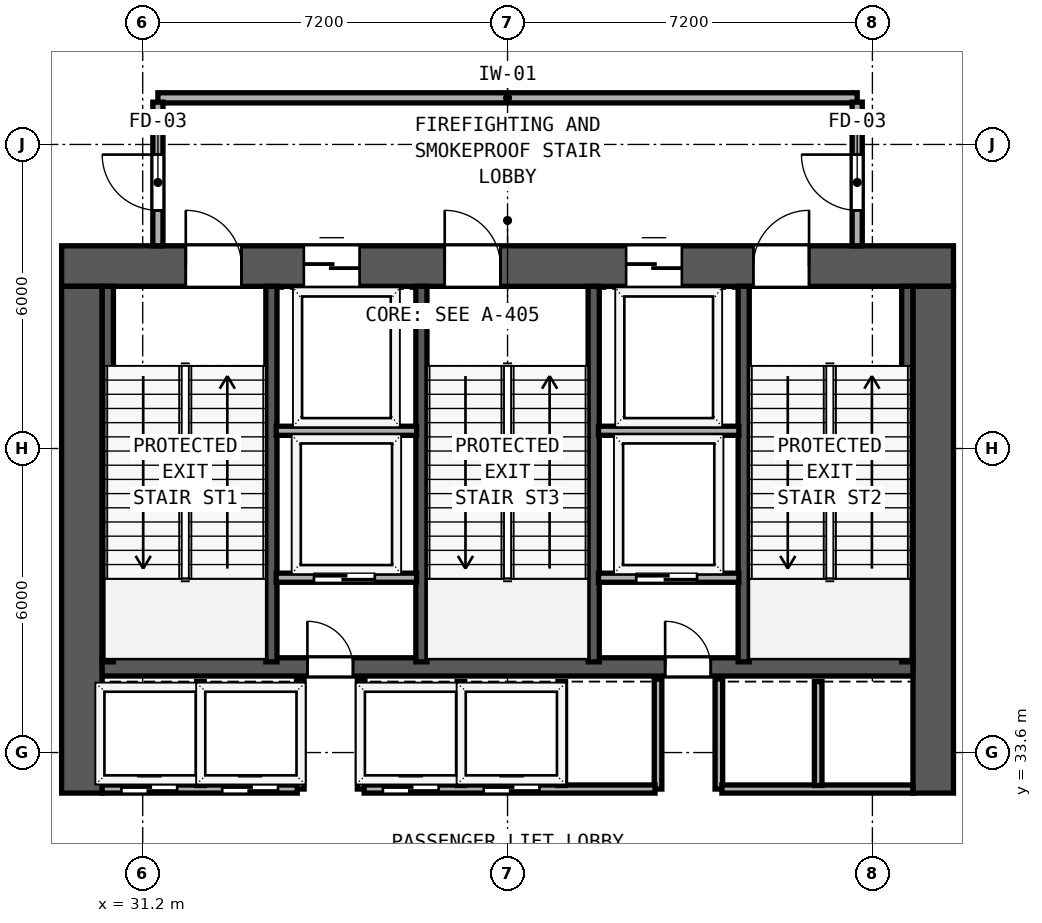
"""IFC4 building model, lengths in metres.
Left out: names, types, materials, properties, quantities, classifications, styles, units other than length and angle.
Written with IfcOpenShell. Run it as: python <this file> out.ifc"""

import sys

from ifc_helpers import new_model, si_unit, direction, frame, frame_2d, origin, place, context, subcontext, project, spatial, rectangle, extrude, element, fill, save


model = new_model("IFC4")
c1 = context("Model", 3, precision=1e-05, world=origin(), true_north=direction((0.0, 1.0)))
c2 = subcontext(c1, "Body", "Model", "MODEL_VIEW")
j1 = project(units=[si_unit("LENGTHUNIT", "METRE"), si_unit("PLANEANGLEUNIT", "RADIAN")], contexts=[c1])
p1 = place(None, origin())
s1 = spatial("IfcSite", under=j1, at=p1, CompositionType="ELEMENT")
p2 = place(p1, origin())
s2 = spatial("IfcBuilding", under=s1, at=p2, CompositionType="ELEMENT")
p3 = place(p2, frame((0.0, 0.0, 10.2)))
s3 = spatial("IfcBuildingStorey", under=s2, at=p3, CompositionType="ELEMENT", Elevation=10.2)
p4 = place(p3, frame((29.6, 43.2, 0.0), z_axis=(0.0, 0.0, 1.0), x_axis=(1.0, 0.0, 0.0)))
e1 = element("IfcWall", 1, at=p4, inside=s3, PredefinedType="SHEAR", context=c2, shape_type="SweptSolid", body=[
    extrude(rectangle(XDim=17.6, YDim=0.8, at=frame_2d((8.8, 0.0))), origin(), (0.0, 0.0, 1.0), 5.16),
])
p5 = place(p4, frame((2.45, 0.0, 0.0)))
e2 = element("IfcOpeningElement", 2, at=p5, cuts=e1, PredefinedType="OPENING", context=c2, shape_type="SweptSolid", body=[
    extrude(rectangle(XDim=1.1, YDim=2.15, at=frame_2d((0.55, 1.075))), frame((0.0, 0.41, 0.0), z_axis=(0.0, -1.0, 0.0), x_axis=(1.0, 0.0, 0.0)), (0.0, 0.0, 1.0), 0.82),
])
p6 = place(p4, frame((7.56, 0.0, 0.0)))
e3 = element("IfcOpeningElement", 3, at=p6, cuts=e1, PredefinedType="OPENING", context=c2, shape_type="SweptSolid", body=[
    extrude(rectangle(XDim=1.1, YDim=2.15, at=frame_2d((0.55, 1.075))), frame((0.0, 0.41, 0.0), z_axis=(0.0, -1.0, 0.0), x_axis=(1.0, 0.0, 0.0)), (0.0, 0.0, 1.0), 0.82),
])
p7 = place(p4, frame((13.65, 0.0, 0.0)))
e4 = element("IfcOpeningElement", 4, at=p7, cuts=e1, PredefinedType="OPENING", context=c2, shape_type="SweptSolid", body=[
    extrude(rectangle(XDim=1.1, YDim=2.15, at=frame_2d((0.55, 1.075))), frame((0.0, 0.41, 0.0), z_axis=(0.0, -1.0, 0.0), x_axis=(1.0, 0.0, 0.0)), (0.0, 0.0, 1.0), 0.82),
])
p8 = place(p4, frame((4.78, 0.0, 0.0)))
e5 = element("IfcOpeningElement", 5, at=p8, cuts=e1, PredefinedType="OPENING", context=c2, shape_type="SweptSolid", body=[
    extrude(rectangle(XDim=1.1, YDim=2.2, at=frame_2d((0.55, 1.1))), frame((0.0, 0.41, 0.0), z_axis=(0.0, -1.0, 0.0), x_axis=(1.0, 0.0, 0.0)), (0.0, 0.0, 1.0), 0.82),
])
p9 = place(p4, frame((11.14, 0.0, 0.0)))
e6 = element("IfcOpeningElement", 6, at=p9, cuts=e1, PredefinedType="OPENING", context=c2, shape_type="SweptSolid", body=[
    extrude(rectangle(XDim=1.1, YDim=2.2, at=frame_2d((0.55, 1.1))), frame((0.0, 0.41, 0.0), z_axis=(0.0, -1.0, 0.0), x_axis=(1.0, 0.0, 0.0)), (0.0, 0.0, 1.0), 0.82),
])
for number, where, z_axis, x_axis in (
    (7, (30.0, 32.8, 0.0), (0.0, 0.0, 1.0), (0.0, 1.0, 0.0)),
    (8, (46.8, 32.8, 0.0), (0.0, 0.0, 1.0), (0.0, 1.0, 0.0)),
):
    element("IfcWall", number, at=place(p3, frame(where, z_axis=z_axis, x_axis=x_axis)), inside=s3, PredefinedType="SHEAR", context=c2, shape_type="SweptSolid", body=[
        extrude(rectangle(XDim=10.0, YDim=0.8, at=frame_2d((5.0, 0.0))), origin(), (0.0, 0.0, 1.0), 5.16),
    ])
p10 = place(p3, frame((30.4, 35.29, 0.0), z_axis=(0.0, 0.0, 1.0), x_axis=(1.0, 0.0, 0.0)))
e9 = element("IfcWall", 9, at=p10, inside=s3, PredefinedType="SHEAR", context=c2, shape_type="SweptSolid", body=[
    extrude(rectangle(XDim=16.0, YDim=0.36, at=frame_2d((8.0, 0.0))), origin(), (0.0, 0.0, 1.0), 5.16),
])
p11 = place(p10, frame((4.95, 0.0, 0.0), z_axis=(0.0, 0.0, 1.0), x_axis=(-1.0, 0.0, 0.0)))
e10 = element("IfcOpeningElement", 10, at=p11, cuts=e9, PredefinedType="OPENING", context=c2, shape_type="SweptSolid", body=[
    extrude(rectangle(XDim=0.9, YDim=2.1, at=frame_2d((0.45, 1.05))), frame((0.0, 0.19, 0.0), z_axis=(0.0, -1.0, 0.0), x_axis=(1.0, 0.0, 0.0)), (0.0, 0.0, 1.0), 0.38),
])
p12 = place(p10, frame((12.01, 0.0, 0.0), z_axis=(0.0, 0.0, 1.0), x_axis=(-1.0, 0.0, 0.0)))
e11 = element("IfcOpeningElement", 11, at=p12, cuts=e9, PredefinedType="OPENING", context=c2, shape_type="SweptSolid", body=[
    extrude(rectangle(XDim=0.9, YDim=2.1, at=frame_2d((0.45, 1.05))), frame((0.0, 0.19, 0.0), z_axis=(0.0, -1.0, 0.0), x_axis=(1.0, 0.0, 0.0)), (0.0, 0.0, 1.0), 0.38),
])
for number, where, z_axis, x_axis in (
    (12, (30.512, 35.39, 0.0), (0.0, 0.0, 1.0), (0.0, 1.0, 0.0)),
    (13, (33.74, 35.39, 0.0), (0.0, 0.0, 1.0), (0.0, 1.0, 0.0)),
    (14, (36.7, 35.39, 0.0), (0.0, 0.0, 1.0), (0.0, 1.0, 0.0)),
    (15, (40.1, 35.39, 0.0), (0.0, 0.0, 1.0), (0.0, 1.0, 0.0)),
    (16, (43.06, 35.39, 0.0), (0.0, 0.0, 1.0), (0.0, 1.0, 0.0)),
    (17, (46.288, 35.39, 0.0), (0.0, 0.0, 1.0), (0.0, 1.0, 0.0)),
):
    element("IfcWall", number, at=place(p3, frame(where, z_axis=z_axis, x_axis=x_axis)), inside=s3, PredefinedType="SHEAR", context=c2, shape_type="SweptSolid", body=[
        extrude(rectangle(XDim=7.41, YDim=0.22, at=frame_2d((3.705, 0.0))), origin(), (0.0, 0.0, 1.0), 5.16),
    ])
p13 = place(p3, frame((31.5, 46.52, 0.0), z_axis=(0.0, 0.0, 1.0), x_axis=(1.0, 0.0, 0.0)))
e18 = element("IfcWall", 18, at=p13, inside=s3, PredefinedType="SOLIDWALL", context=c2, shape_type="SweptSolid", body=[
    extrude(rectangle(XDim=13.8, YDim=0.2, at=frame_2d((6.9, 0.0))), origin(), (0.0, 0.0, 1.0), 5.16),
])
p14 = place(p3, frame((31.5, 43.6, 0.0), z_axis=(0.0, 0.0, 1.0), x_axis=(0.0, 1.0, 0.0)))
e19 = element("IfcWall", 19, at=p14, inside=s3, PredefinedType="SOLIDWALL", context=c2, shape_type="SweptSolid", body=[
    extrude(rectangle(XDim=2.835, YDim=0.2, at=frame_2d((1.417, 0.0))), origin(), (0.0, 0.0, 1.0), 5.16),
])
p15 = place(p14, frame((1.8, 0.0, 0.0), z_axis=(0.0, 0.0, 1.0), x_axis=(-1.0, 0.0, 0.0)))
e20 = element("IfcOpeningElement", 20, at=p15, cuts=e19, PredefinedType="OPENING", context=c2, shape_type="SweptSolid", body=[
    extrude(rectangle(XDim=1.1, YDim=2.15, at=frame_2d((0.55, 1.075))), frame((0.0, 0.11, 0.0), z_axis=(0.0, -1.0, 0.0), x_axis=(1.0, 0.0, 0.0)), (0.0, 0.0, 1.0), 0.22),
])
p16 = place(p3, frame((45.3, 43.6, 0.0), z_axis=(0.0, 0.0, 1.0), x_axis=(0.0, 1.0, 0.0)))
e21 = element("IfcWall", 21, at=p16, inside=s3, PredefinedType="SOLIDWALL", context=c2, shape_type="SweptSolid", body=[
    extrude(rectangle(XDim=2.835, YDim=0.2, at=frame_2d((1.417, 0.0))), origin(), (0.0, 0.0, 1.0), 5.16),
])
p17 = place(p16, frame((0.7, 0.0, 0.0)))
e22 = element("IfcOpeningElement", 22, at=p17, cuts=e21, PredefinedType="OPENING", context=c2, shape_type="SweptSolid", body=[
    extrude(rectangle(XDim=1.1, YDim=2.15, at=frame_2d((0.55, 1.075))), frame((0.0, 0.11, 0.0), z_axis=(0.0, -1.0, 0.0), x_axis=(1.0, 0.0, 0.0)), (0.0, 0.0, 1.0), 0.22),
])
for number, where, z_axis, x_axis in (
    (23, (33.835, 39.95, 0.0), (0.0, 0.0, 1.0), (1.0, 0.0, 0.0)),
    (24, (40.195, 39.95, 0.0), (0.0, 0.0, 1.0), (1.0, 0.0, 0.0)),
):
    element("IfcWall", number, at=place(p3, frame(where, z_axis=z_axis, x_axis=x_axis)), inside=s3, PredefinedType="SOLIDWALL", context=c2, shape_type="SweptSolid", body=[
        extrude(rectangle(XDim=2.77, YDim=0.18, at=frame_2d((1.385, 0.0))), origin(), (0.0, 0.0, 1.0), 5.16),
    ])
p18 = place(p3, frame((33.835, 37.05, 0.0), z_axis=(0.0, 0.0, 1.0), x_axis=(1.0, 0.0, 0.0)))
e25 = element("IfcWall", 25, at=p18, inside=s3, PredefinedType="SOLIDWALL", context=c2, shape_type="SweptSolid", body=[
    extrude(rectangle(XDim=2.77, YDim=0.18, at=frame_2d((1.385, 0.0))), origin(), (0.0, 0.0, 1.0), 5.16),
])
p19 = place(p18, frame((1.945, 0.0, 0.0), z_axis=(0.0, 0.0, 1.0), x_axis=(-1.0, 0.0, 0.0)))
e26 = element("IfcOpeningElement", 26, at=p19, cuts=e25, PredefinedType="OPENING", context=c2, shape_type="SweptSolid", body=[
    extrude(rectangle(XDim=1.2, YDim=2.2, at=frame_2d((0.6, 1.1))), frame((0.0, 0.1, 0.0), z_axis=(0.0, -1.0, 0.0), x_axis=(1.0, 0.0, 0.0)), (0.0, 0.0, 1.0), 0.2),
])
for number, where, z_axis, x_axis in (
    (27, (34.31, 32.88, 0.0), (0.0, 0.0, 1.0), (0.0, 1.0, 0.0)),
    (28, (35.51, 32.88, 0.0), (0.0, 0.0, 1.0), (0.0, 1.0, 0.0)),
):
    element("IfcWall", number, at=place(p3, frame(where, z_axis=z_axis, x_axis=x_axis)), inside=s3, PredefinedType="SOLIDWALL", context=c2, shape_type="SweptSolid", body=[
        extrude(rectangle(XDim=2.17, YDim=0.15, at=frame_2d((1.085, 0.0))), origin(), (0.0, 0.0, 1.0), 5.16),
    ])
p20 = place(p3, frame((40.195, 37.05, 0.0), z_axis=(0.0, 0.0, 1.0), x_axis=(1.0, 0.0, 0.0)))
e29 = element("IfcWall", 29, at=p20, inside=s3, PredefinedType="SOLIDWALL", context=c2, shape_type="SweptSolid", body=[
    extrude(rectangle(XDim=2.77, YDim=0.18, at=frame_2d((1.385, 0.0))), origin(), (0.0, 0.0, 1.0), 5.16),
])
p21 = place(p20, frame((1.945, 0.0, 0.0), z_axis=(0.0, 0.0, 1.0), x_axis=(-1.0, 0.0, 0.0)))
e30 = element("IfcOpeningElement", 30, at=p21, cuts=e29, PredefinedType="OPENING", context=c2, shape_type="SweptSolid", body=[
    extrude(rectangle(XDim=1.2, YDim=2.2, at=frame_2d((0.6, 1.1))), frame((0.0, 0.1, 0.0), z_axis=(0.0, -1.0, 0.0), x_axis=(1.0, 0.0, 0.0)), (0.0, 0.0, 1.0), 0.2),
])
for number, where, z_axis, x_axis in (
    (31, (41.37, 32.88, 0.0), (0.0, 0.0, 1.0), (0.0, 1.0, 0.0)),
    (32, (42.57, 32.88, 0.0), (0.0, 0.0, 1.0), (0.0, 1.0, 0.0)),
):
    element("IfcWall", number, at=place(p3, frame(where, z_axis=z_axis, x_axis=x_axis)), inside=s3, PredefinedType="SOLIDWALL", context=c2, shape_type="SweptSolid", body=[
        extrude(rectangle(XDim=2.17, YDim=0.15, at=frame_2d((1.085, 0.0))), origin(), (0.0, 0.0, 1.0), 5.16),
    ])
p22 = place(p3, frame((30.4, 32.88, 0.0), z_axis=(0.0, 0.0, 1.0), x_axis=(1.0, 0.0, 0.0)))
e33 = element("IfcWall", 33, at=p22, inside=s3, PredefinedType="SOLIDWALL", context=c2, shape_type="SweptSolid", body=[
    extrude(rectangle(XDim=3.85, YDim=0.16, at=frame_2d((1.925, 0.0))), origin(), (0.0, 0.0, 1.0), 5.16),
])
p23 = place(p22, frame((1.48, 0.0, 0.0), z_axis=(0.0, 0.0, 1.0), x_axis=(-1.0, 0.0, 0.0)))
e34 = element("IfcOpeningElement", 34, at=p23, cuts=e33, PredefinedType="OPENING", context=c2, shape_type="SweptSolid", body=[
    extrude(rectangle(XDim=1.1, YDim=2.2, at=frame_2d((0.55, 1.1))), frame((0.0, 0.09, 0.0), z_axis=(0.0, -1.0, 0.0), x_axis=(1.0, 0.0, 0.0)), (0.0, 0.0, 1.0), 0.18),
])
p24 = place(p22, frame((3.47, 0.0, 0.0), z_axis=(0.0, 0.0, 1.0), x_axis=(-1.0, 0.0, 0.0)))
e35 = element("IfcOpeningElement", 35, at=p24, cuts=e33, PredefinedType="OPENING", context=c2, shape_type="SweptSolid", body=[
    extrude(rectangle(XDim=1.1, YDim=2.2, at=frame_2d((0.55, 1.1))), frame((0.0, 0.09, 0.0), z_axis=(0.0, -1.0, 0.0), x_axis=(1.0, 0.0, 0.0)), (0.0, 0.0, 1.0), 0.18),
])
p25 = place(p3, frame((35.57, 32.88, 0.0), z_axis=(0.0, 0.0, 1.0), x_axis=(1.0, 0.0, 0.0)))
e36 = element("IfcWall", 36, at=p25, inside=s3, PredefinedType="SOLIDWALL", context=c2, shape_type="SweptSolid", body=[
    extrude(rectangle(XDim=5.74, YDim=0.16, at=frame_2d((2.87, 0.0))), origin(), (0.0, 0.0, 1.0), 5.16),
])
p26 = place(p25, frame((1.47, 0.0, 0.0), z_axis=(0.0, 0.0, 1.0), x_axis=(-1.0, 0.0, 0.0)))
e37 = element("IfcOpeningElement", 37, at=p26, cuts=e36, PredefinedType="OPENING", context=c2, shape_type="SweptSolid", body=[
    extrude(rectangle(XDim=1.1, YDim=2.2, at=frame_2d((0.55, 1.1))), frame((0.0, 0.09, 0.0), z_axis=(0.0, -1.0, 0.0), x_axis=(1.0, 0.0, 0.0)), (0.0, 0.0, 1.0), 0.18),
])
p27 = place(p25, frame((3.46, 0.0, 0.0), z_axis=(0.0, 0.0, 1.0), x_axis=(-1.0, 0.0, 0.0)))
e38 = element("IfcOpeningElement", 38, at=p27, cuts=e36, PredefinedType="OPENING", context=c2, shape_type="SweptSolid", body=[
    extrude(rectangle(XDim=1.1, YDim=2.2, at=frame_2d((0.55, 1.1))), frame((0.0, 0.09, 0.0), z_axis=(0.0, -1.0, 0.0), x_axis=(1.0, 0.0, 0.0)), (0.0, 0.0, 1.0), 0.18),
])
p28 = place(p3, frame((42.63, 32.88, 0.0), z_axis=(0.0, 0.0, 1.0), x_axis=(1.0, 0.0, 0.0)))
e39 = element("IfcWall", 39, at=p28, inside=s3, PredefinedType="SOLIDWALL", context=c2, shape_type="SweptSolid", body=[
    extrude(rectangle(XDim=3.77, YDim=0.16, at=frame_2d((1.885, 0.0))), origin(), (0.0, 0.0, 1.0), 5.16),
])
for number, where, z_axis, x_axis in (
    (40, (32.34, 32.95, 0.0), (0.0, 0.0, 1.0), (0.0, 1.0, 0.0)),
    (41, (37.48, 32.95, 0.0), (0.0, 0.0, 1.0), (0.0, 1.0, 0.0)),
    (42, (39.47, 32.95, 0.0), (0.0, 0.0, 1.0), (0.0, 1.0, 0.0)),
    (43, (44.53, 32.95, 0.0), (0.0, 0.0, 1.0), (0.0, 1.0, 0.0)),
):
    element("IfcWall", number, at=place(p3, frame(where, z_axis=z_axis, x_axis=x_axis)), inside=s3, PredefinedType="SOLIDWALL", context=c2, shape_type="SweptSolid", body=[
        extrude(rectangle(XDim=2.05, YDim=0.15, at=frame_2d((1.025, 0.0))), origin(), (0.0, 0.0, 1.0), 5.16),
    ])
p29 = place(p5, origin())
e44 = element("IfcDoor", 44, at=p29, inside=s3, OperationType="SINGLE_SWING_LEFT", PredefinedType="DOOR", context=c2, shape_type="SweptSolid", body=[
    extrude(rectangle(XDim=1.1, YDim=2.15, at=frame_2d((0.55, 1.075))), frame((0.0, 0.185, 0.0), z_axis=(0.0, -1.0, 0.0), x_axis=(1.0, 0.0, 0.0)), (0.0, 0.0, 1.0), 0.05),
])
fill(e2, e44)
p30 = place(p6, origin())
e45 = element("IfcDoor", 45, at=p30, inside=s3, OperationType="SINGLE_SWING_LEFT", PredefinedType="DOOR", context=c2, shape_type="SweptSolid", body=[
    extrude(rectangle(XDim=1.1, YDim=2.15, at=frame_2d((0.55, 1.075))), frame((0.0, 0.185, 0.0), z_axis=(0.0, -1.0, 0.0), x_axis=(1.0, 0.0, 0.0)), (0.0, 0.0, 1.0), 0.05),
])
fill(e3, e45)
p31 = place(p7, origin())
e46 = element("IfcDoor", 46, at=p31, inside=s3, OperationType="SINGLE_SWING_RIGHT", PredefinedType="DOOR", context=c2, shape_type="SweptSolid", body=[
    extrude(rectangle(XDim=1.1, YDim=2.15, at=frame_2d((0.55, 1.075))), frame((0.0, 0.185, 0.0), z_axis=(0.0, -1.0, 0.0), x_axis=(1.0, 0.0, 0.0)), (0.0, 0.0, 1.0), 0.05),
])
fill(e4, e46)
p32 = place(p15, origin())
e47 = element("IfcDoor", 47, at=p32, inside=s3, OperationType="SINGLE_SWING_LEFT", PredefinedType="DOOR", context=c2, shape_type="SweptSolid", body=[
    extrude(rectangle(XDim=1.1, YDim=2.15, at=frame_2d((0.55, 1.075))), frame((0.0, 0.025, 0.0), z_axis=(0.0, -1.0, 0.0), x_axis=(1.0, 0.0, 0.0)), (0.0, 0.0, 1.0), 0.05),
])
fill(e20, e47)
p33 = place(p17, origin())
e48 = element("IfcDoor", 48, at=p33, inside=s3, OperationType="SINGLE_SWING_RIGHT", PredefinedType="DOOR", context=c2, shape_type="SweptSolid", body=[
    extrude(rectangle(XDim=1.1, YDim=2.15, at=frame_2d((0.55, 1.075))), frame((0.0, 0.025, 0.0), z_axis=(0.0, -1.0, 0.0), x_axis=(1.0, 0.0, 0.0)), (0.0, 0.0, 1.0), 0.05),
])
fill(e22, e48)
p34 = place(p8, origin())
e49 = element("IfcDoor", 49, at=p34, inside=s3, OperationType="SLIDING_TO_LEFT", PredefinedType="DOOR", context=c2, shape_type="SweptSolid", body=[
    extrude(rectangle(XDim=1.1, YDim=2.2, at=frame_2d((0.55, 1.1))), frame((0.0, 0.185, 0.0), z_axis=(0.0, -1.0, 0.0), x_axis=(1.0, 0.0, 0.0)), (0.0, 0.0, 1.0), 0.05),
])
fill(e5, e49)
p35 = place(p9, origin())
e50 = element("IfcDoor", 50, at=p35, inside=s3, OperationType="SLIDING_TO_LEFT", PredefinedType="DOOR", context=c2, shape_type="SweptSolid", body=[
    extrude(rectangle(XDim=1.1, YDim=2.2, at=frame_2d((0.55, 1.1))), frame((0.0, 0.185, 0.0), z_axis=(0.0, -1.0, 0.0), x_axis=(1.0, 0.0, 0.0)), (0.0, 0.0, 1.0), 0.05),
])
fill(e6, e50)
p36 = place(p19, origin())
e51 = element("IfcDoor", 51, at=p36, inside=s3, OperationType="SLIDING_TO_RIGHT", PredefinedType="DOOR", context=c2, shape_type="SweptSolid", body=[
    extrude(rectangle(XDim=1.2, YDim=2.2, at=frame_2d((0.6, 1.1))), frame((0.0, 0.025, 0.0), z_axis=(0.0, -1.0, 0.0), x_axis=(1.0, 0.0, 0.0)), (0.0, 0.0, 1.0), 0.05),
])
fill(e26, e51)
p37 = place(p11, origin())
e52 = element("IfcDoor", 52, at=p37, inside=s3, OperationType="SINGLE_SWING_RIGHT", PredefinedType="DOOR", context=c2, shape_type="SweptSolid", body=[
    extrude(rectangle(XDim=0.9, YDim=2.1, at=frame_2d((0.45, 1.05))), frame((0.0, 0.025, 0.0), z_axis=(0.0, -1.0, 0.0), x_axis=(1.0, 0.0, 0.0)), (0.0, 0.0, 1.0), 0.05),
])
fill(e10, e52)
p38 = place(p21, origin())
e53 = element("IfcDoor", 53, at=p38, inside=s3, OperationType="SLIDING_TO_RIGHT", PredefinedType="DOOR", context=c2, shape_type="SweptSolid", body=[
    extrude(rectangle(XDim=1.2, YDim=2.2, at=frame_2d((0.6, 1.1))), frame((0.0, 0.025, 0.0), z_axis=(0.0, -1.0, 0.0), x_axis=(1.0, 0.0, 0.0)), (0.0, 0.0, 1.0), 0.05),
])
fill(e30, e53)
p39 = place(p12, origin())
e54 = element("IfcDoor", 54, at=p39, inside=s3, OperationType="SINGLE_SWING_RIGHT", PredefinedType="DOOR", context=c2, shape_type="SweptSolid", body=[
    extrude(rectangle(XDim=0.9, YDim=2.1, at=frame_2d((0.45, 1.05))), frame((0.0, 0.025, 0.0), z_axis=(0.0, -1.0, 0.0), x_axis=(1.0, 0.0, 0.0)), (0.0, 0.0, 1.0), 0.05),
])
fill(e11, e54)
p40 = place(p23, origin())
e55 = element("IfcDoor", 55, at=p40, inside=s3, OperationType="SLIDING_TO_LEFT", PredefinedType="DOOR", context=c2, shape_type="SweptSolid", body=[
    extrude(rectangle(XDim=1.1, YDim=2.2, at=frame_2d((0.55, 1.1))), frame((0.0, 0.025, 0.0), z_axis=(0.0, -1.0, 0.0), x_axis=(1.0, 0.0, 0.0)), (0.0, 0.0, 1.0), 0.05),
])
fill(e34, e55)
p41 = place(p24, origin())
e56 = element("IfcDoor", 56, at=p41, inside=s3, OperationType="SLIDING_TO_LEFT", PredefinedType="DOOR", context=c2, shape_type="SweptSolid", body=[
    extrude(rectangle(XDim=1.1, YDim=2.2, at=frame_2d((0.55, 1.1))), frame((0.0, 0.025, 0.0), z_axis=(0.0, -1.0, 0.0), x_axis=(1.0, 0.0, 0.0)), (0.0, 0.0, 1.0), 0.05),
])
fill(e35, e56)
p42 = place(p26, origin())
e57 = element("IfcDoor", 57, at=p42, inside=s3, OperationType="SLIDING_TO_LEFT", PredefinedType="DOOR", context=c2, shape_type="SweptSolid", body=[
    extrude(rectangle(XDim=1.1, YDim=2.2, at=frame_2d((0.55, 1.1))), frame((0.0, 0.025, 0.0), z_axis=(0.0, -1.0, 0.0), x_axis=(1.0, 0.0, 0.0)), (0.0, 0.0, 1.0), 0.05),
])
fill(e37, e57)
p43 = place(p27, origin())
e58 = element("IfcDoor", 58, at=p43, inside=s3, OperationType="SLIDING_TO_LEFT", PredefinedType="DOOR", context=c2, shape_type="SweptSolid", body=[
    extrude(rectangle(XDim=1.1, YDim=2.2, at=frame_2d((0.55, 1.1))), frame((0.0, 0.025, 0.0), z_axis=(0.0, -1.0, 0.0), x_axis=(1.0, 0.0, 0.0)), (0.0, 0.0, 1.0), 0.05),
])
fill(e38, e58)
save(model, sys.argv[1])
